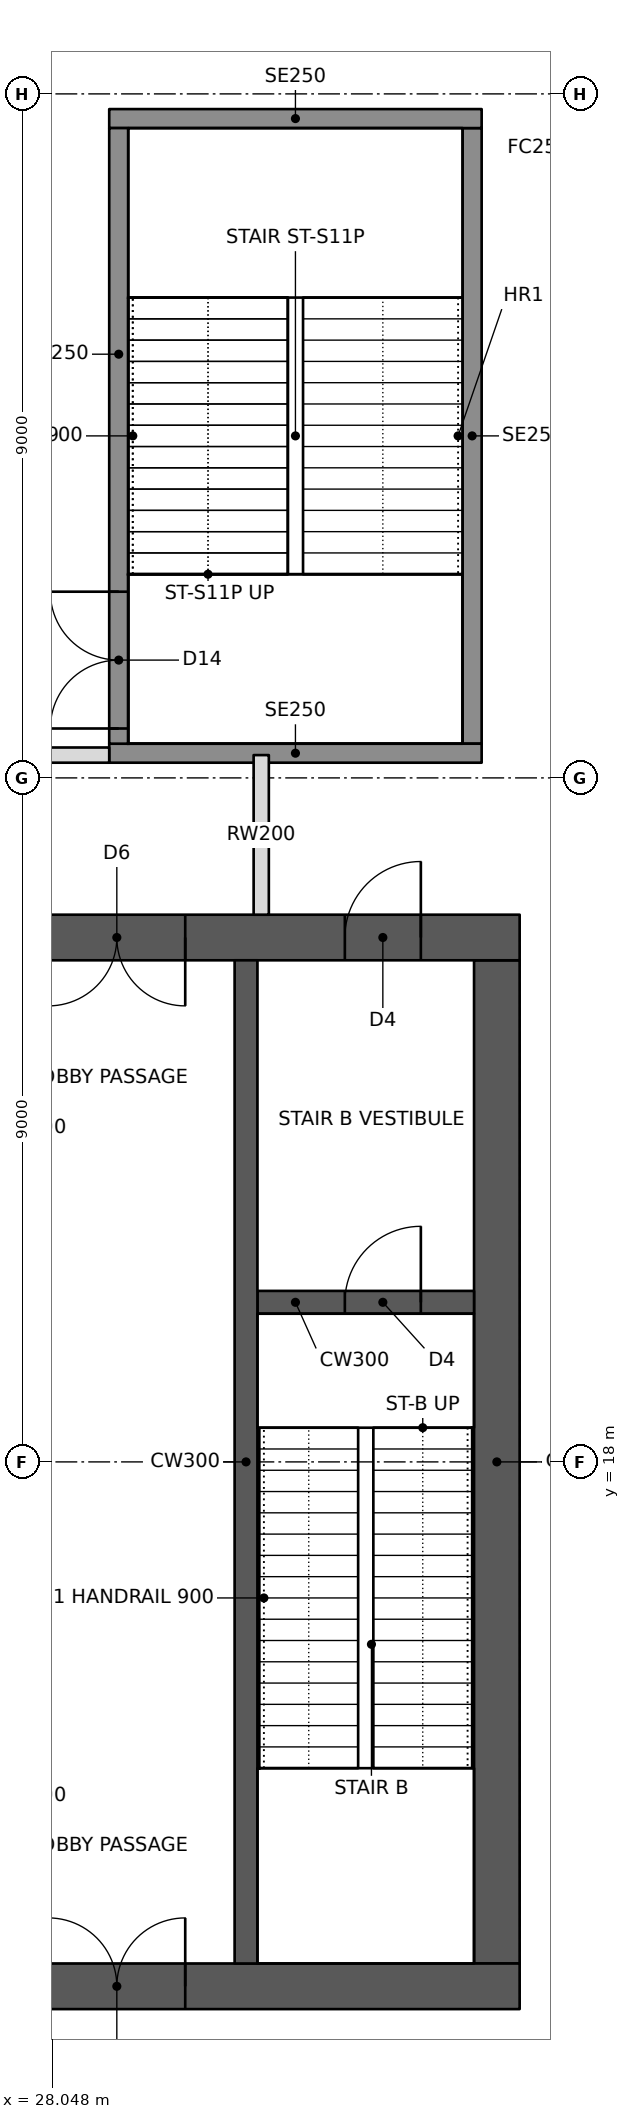
"""IFC4 building model, lengths in metres.
Left out: names, types, materials, properties, quantities, classifications, styles, units other than length and angle.
Written with IfcOpenShell. Run it as: python <this file> out.ifc"""

import sys

from ifc_helpers import new_model, si_unit, direction, frame, frame_2d, origin, place, context, subcontext, project, spatial, rectangle, extrude, element, fill, save


model = new_model("IFC4")
c1 = context("Model", 3, precision=1e-05, world=origin(), true_north=direction((0.0, 1.0)))
c2 = subcontext(c1, "Body", "Model", "MODEL_VIEW")
j1 = project(units=[si_unit("LENGTHUNIT", "METRE"), si_unit("PLANEANGLEUNIT", "RADIAN")], contexts=[c1])
p1 = place(None, origin())
s1 = spatial("IfcSite", under=j1, at=p1, CompositionType="ELEMENT")
p2 = place(p1, origin())
s2 = spatial("IfcBuilding", under=s1, at=p2, CompositionType="ELEMENT")
p3 = place(p2, origin())
s3 = spatial("IfcBuildingStorey", under=s2, at=p3, CompositionType="ELEMENT", Elevation=0.0)
p4 = place(p3, frame((10.8, 11.1, 0.0), z_axis=(0.0, 0.0, 1.0), x_axis=(1.0, 0.0, 0.0)))
e1 = element("IfcWall", 1, at=p4, inside=s3, PredefinedType="SHEAR", context=c2, shape_type="SweptSolid", body=[
    extrude(rectangle(XDim=23.4, YDim=0.6, at=frame_2d((11.7, 0.0))), origin(), (0.0, 0.0, 1.0), 6.0),
])
p5 = place(p4, frame((1.0, 0.0, 0.0)))
e2 = element("IfcOpeningElement", 2, at=p5, cuts=e1, PredefinedType="OPENING", context=c2, shape_type="SweptSolid", body=[
    extrude(rectangle(XDim=1.0, YDim=2.1, at=frame_2d((0.5, 1.05))), frame((0.0, 0.31, 0.0), z_axis=(0.0, -1.0, 0.0), x_axis=(1.0, 0.0, 0.0)), (0.0, 0.0, 1.0), 0.62),
])
p6 = place(p4, frame((17.2, 0.0, 0.0)))
e3 = element("IfcOpeningElement", 3, at=p6, cuts=e1, PredefinedType="OPENING", context=c2, shape_type="SweptSolid", body=[
    extrude(rectangle(XDim=1.8, YDim=2.1, at=frame_2d((0.9, 1.05))), frame((0.0, 0.31, 0.0), z_axis=(0.0, -1.0, 0.0), x_axis=(1.0, 0.0, 0.0)), (0.0, 0.0, 1.0), 0.62),
])
p7 = place(p3, frame((10.8, 24.9, 0.0), z_axis=(0.0, 0.0, 1.0), x_axis=(1.0, 0.0, 0.0)))
e4 = element("IfcWall", 4, at=p7, inside=s3, PredefinedType="SHEAR", context=c2, shape_type="SweptSolid", body=[
    extrude(rectangle(XDim=23.4, YDim=0.6, at=frame_2d((11.7, 0.0))), origin(), (0.0, 0.0, 1.0), 6.0),
])
p8 = place(p7, frame((17.2, 0.0, 0.0)))
e5 = element("IfcOpeningElement", 5, at=p8, cuts=e4, PredefinedType="OPENING", context=c2, shape_type="SweptSolid", body=[
    extrude(rectangle(XDim=1.8, YDim=2.1, at=frame_2d((0.9, 1.05))), frame((0.0, 0.31, 0.0), z_axis=(0.0, -1.0, 0.0), x_axis=(1.0, 0.0, 0.0)), (0.0, 0.0, 1.0), 0.62),
])
p9 = place(p7, frame((21.1, 0.0, 0.0)))
e6 = element("IfcOpeningElement", 6, at=p9, cuts=e4, PredefinedType="OPENING", context=c2, shape_type="SweptSolid", body=[
    extrude(rectangle(XDim=1.0, YDim=2.1, at=frame_2d((0.5, 1.05))), frame((0.0, 0.31, 0.0), z_axis=(0.0, -1.0, 0.0), x_axis=(1.0, 0.0, 0.0)), (0.0, 0.0, 1.0), 0.62),
])
p10 = place(p3, frame((33.9, 11.4, 0.0), z_axis=(0.0, 0.0, 1.0), x_axis=(0.0, 1.0, 0.0)))
e7 = element("IfcWall", 7, at=p10, inside=s3, PredefinedType="SHEAR", context=c2, shape_type="SweptSolid", body=[
    extrude(rectangle(XDim=13.2, YDim=0.6, at=frame_2d((6.6, 0.0))), origin(), (0.0, 0.0, 1.0), 6.0),
])
p11 = place(p3, frame((30.6, 11.4, 0.0), z_axis=(0.0, 0.0, 1.0), x_axis=(0.0, 1.0, 0.0)))
e8 = element("IfcWall", 8, at=p11, inside=s3, PredefinedType="SHEAR", context=c2, shape_type="SweptSolid", body=[
    extrude(rectangle(XDim=13.2, YDim=0.3, at=frame_2d((6.6, 0.0))), origin(), (0.0, 0.0, 1.0), 6.0),
])
p12 = place(p3, frame((30.75, 20.1, 0.0), z_axis=(0.0, 0.0, 1.0), x_axis=(1.0, 0.0, 0.0)))
e9 = element("IfcWall", 9, at=p12, inside=s3, PredefinedType="SHEAR", context=c2, shape_type="SweptSolid", body=[
    extrude(rectangle(XDim=2.85, YDim=0.3, at=frame_2d((1.425, 0.0))), origin(), (0.0, 0.0, 1.0), 6.0),
])
p13 = place(p12, frame((1.15, 0.0, 0.0)))
e10 = element("IfcOpeningElement", 10, at=p13, cuts=e9, PredefinedType="OPENING", context=c2, shape_type="SweptSolid", body=[
    extrude(rectangle(XDim=1.0, YDim=2.1, at=frame_2d((0.5, 1.05))), frame((0.0, 0.16, 0.0), z_axis=(0.0, -1.0, 0.0), x_axis=(1.0, 0.0, 0.0)), (0.0, 0.0, 1.0), 0.32),
])
p14 = place(p3, frame((30.8, 25.2, 0.0), z_axis=(0.0, 0.0, 1.0), x_axis=(0.0, 1.0, 0.0)))
e11 = element("IfcWall", 11, at=p14, inside=s3, PredefinedType="PARTITIONING", context=c2, shape_type="SweptSolid", body=[
    extrude(rectangle(XDim=2.1, YDim=0.2, at=frame_2d((1.05, 0.0))), origin(), (0.0, 0.0, 1.0), 4.891),
])
p15 = place(p3, frame((27.4, 27.3, 0.0), z_axis=(0.0, 0.0, 1.0), x_axis=(1.0, 0.0, 0.0)))
e12 = element("IfcWall", 12, at=p15, inside=s3, PredefinedType="PARTITIONING", context=c2, shape_type="SweptSolid", body=[
    extrude(rectangle(XDim=1.4, YDim=0.2, at=frame_2d((0.7, 0.0))), origin(), (0.0, 0.0, 1.0), 5.75),
])
for number, where, z_axis, x_axis in (
    (13, (28.8, 27.325, 0.0), (0.0, 0.0, 1.0), (1.0, 0.0, 0.0)),
    (14, (28.8, 35.675, 0.0), (0.0, 0.0, 1.0), (1.0, 0.0, 0.0)),
):
    element("IfcWall", number, at=place(p3, frame(where, z_axis=z_axis, x_axis=x_axis)), inside=s3, PredefinedType="SOLIDWALL", context=c2, shape_type="SweptSolid", body=[
        extrude(rectangle(XDim=4.9, YDim=0.25, at=frame_2d((2.45, 0.0))), origin(), (0.0, 0.0, 1.0), 5.75),
    ])
p16 = place(p3, frame((28.925, 27.45, 0.0), z_axis=(0.0, 0.0, 1.0), x_axis=(0.0, 1.0, 0.0)))
e15 = element("IfcWall", 15, at=p16, inside=s3, PredefinedType="SOLIDWALL", context=c2, shape_type="SweptSolid", body=[
    extrude(rectangle(XDim=8.1, YDim=0.25, at=frame_2d((4.05, 0.0))), origin(), (0.0, 0.0, 1.0), 5.75),
])
p17 = place(p16, frame((0.2, 0.0, 0.0)))
e16 = element("IfcOpeningElement", 16, at=p17, cuts=e15, PredefinedType="OPENING", context=c2, shape_type="SweptSolid", body=[
    extrude(rectangle(XDim=1.8, YDim=2.1, at=frame_2d((0.9, 1.05))), frame((0.0, 0.135, 0.0), z_axis=(0.0, -1.0, 0.0), x_axis=(1.0, 0.0, 0.0)), (0.0, 0.0, 1.0), 0.27),
])
p18 = place(p3, frame((33.575, 27.45, 0.0), z_axis=(0.0, 0.0, 1.0), x_axis=(0.0, 1.0, 0.0)))
e17 = element("IfcWall", 17, at=p18, inside=s3, PredefinedType="SOLIDWALL", context=c2, shape_type="SweptSolid", body=[
    extrude(rectangle(XDim=8.1, YDim=0.25, at=frame_2d((4.05, 0.0))), origin(), (0.0, 0.0, 1.0), 5.75),
])
p19 = place(p6, origin())
e18 = element("IfcDoor", 18, at=p19, inside=s3, OperationType="DOUBLE_DOOR_SINGLE_SWING", PredefinedType="DOOR", context=c2, shape_type="SweptSolid", body=[
    extrude(rectangle(XDim=1.8, YDim=2.1, at=frame_2d((0.9, 1.05))), frame((0.0, 0.025, 0.0), z_axis=(0.0, -1.0, 0.0), x_axis=(1.0, 0.0, 0.0)), (0.0, 0.0, 1.0), 0.05),
])
fill(e3, e18)
p20 = place(p8, frame((1.8, 0.0, 0.0), z_axis=(0.0, 0.0, 1.0), x_axis=(-1.0, 0.0, 0.0)))
e19 = element("IfcDoor", 19, at=p20, inside=s3, OperationType="DOUBLE_DOOR_SINGLE_SWING", PredefinedType="DOOR", context=c2, shape_type="SweptSolid", body=[
    extrude(rectangle(XDim=1.8, YDim=2.1, at=frame_2d((0.9, 1.05))), frame((0.0, 0.025, 0.0), z_axis=(0.0, -1.0, 0.0), x_axis=(1.0, 0.0, 0.0)), (0.0, 0.0, 1.0), 0.05),
])
fill(e5, e19)
p21 = place(p9, origin())
e20 = element("IfcDoor", 20, at=p21, inside=s3, OperationType="SINGLE_SWING_RIGHT", PredefinedType="DOOR", context=c2, shape_type="SweptSolid", body=[
    extrude(rectangle(XDim=1.0, YDim=2.1, at=frame_2d((0.5, 1.05))), frame((0.0, 0.025, 0.0), z_axis=(0.0, -1.0, 0.0), x_axis=(1.0, 0.0, 0.0)), (0.0, 0.0, 1.0), 0.05),
])
fill(e6, e20)
p22 = place(p13, origin())
e21 = element("IfcDoor", 21, at=p22, inside=s3, OperationType="SINGLE_SWING_RIGHT", PredefinedType="DOOR", context=c2, shape_type="SweptSolid", body=[
    extrude(rectangle(XDim=1.0, YDim=2.1, at=frame_2d((0.5, 1.05))), frame((0.0, 0.025, 0.0), z_axis=(0.0, -1.0, 0.0), x_axis=(1.0, 0.0, 0.0)), (0.0, 0.0, 1.0), 0.05),
])
fill(e10, e21)
p23 = place(p17, origin())
e22 = element("IfcDoor", 22, at=p23, inside=s3, OperationType="DOUBLE_DOOR_SINGLE_SWING", PredefinedType="DOOR", context=c2, shape_type="SweptSolid", body=[
    extrude(rectangle(XDim=1.8, YDim=2.1, at=frame_2d((0.9, 1.05))), frame((0.0, 0.025, 0.0), z_axis=(0.0, -1.0, 0.0), x_axis=(1.0, 0.0, 0.0)), (0.0, 0.0, 1.0), 0.05),
])
fill(e16, e22)
save(model, sys.argv[1])
